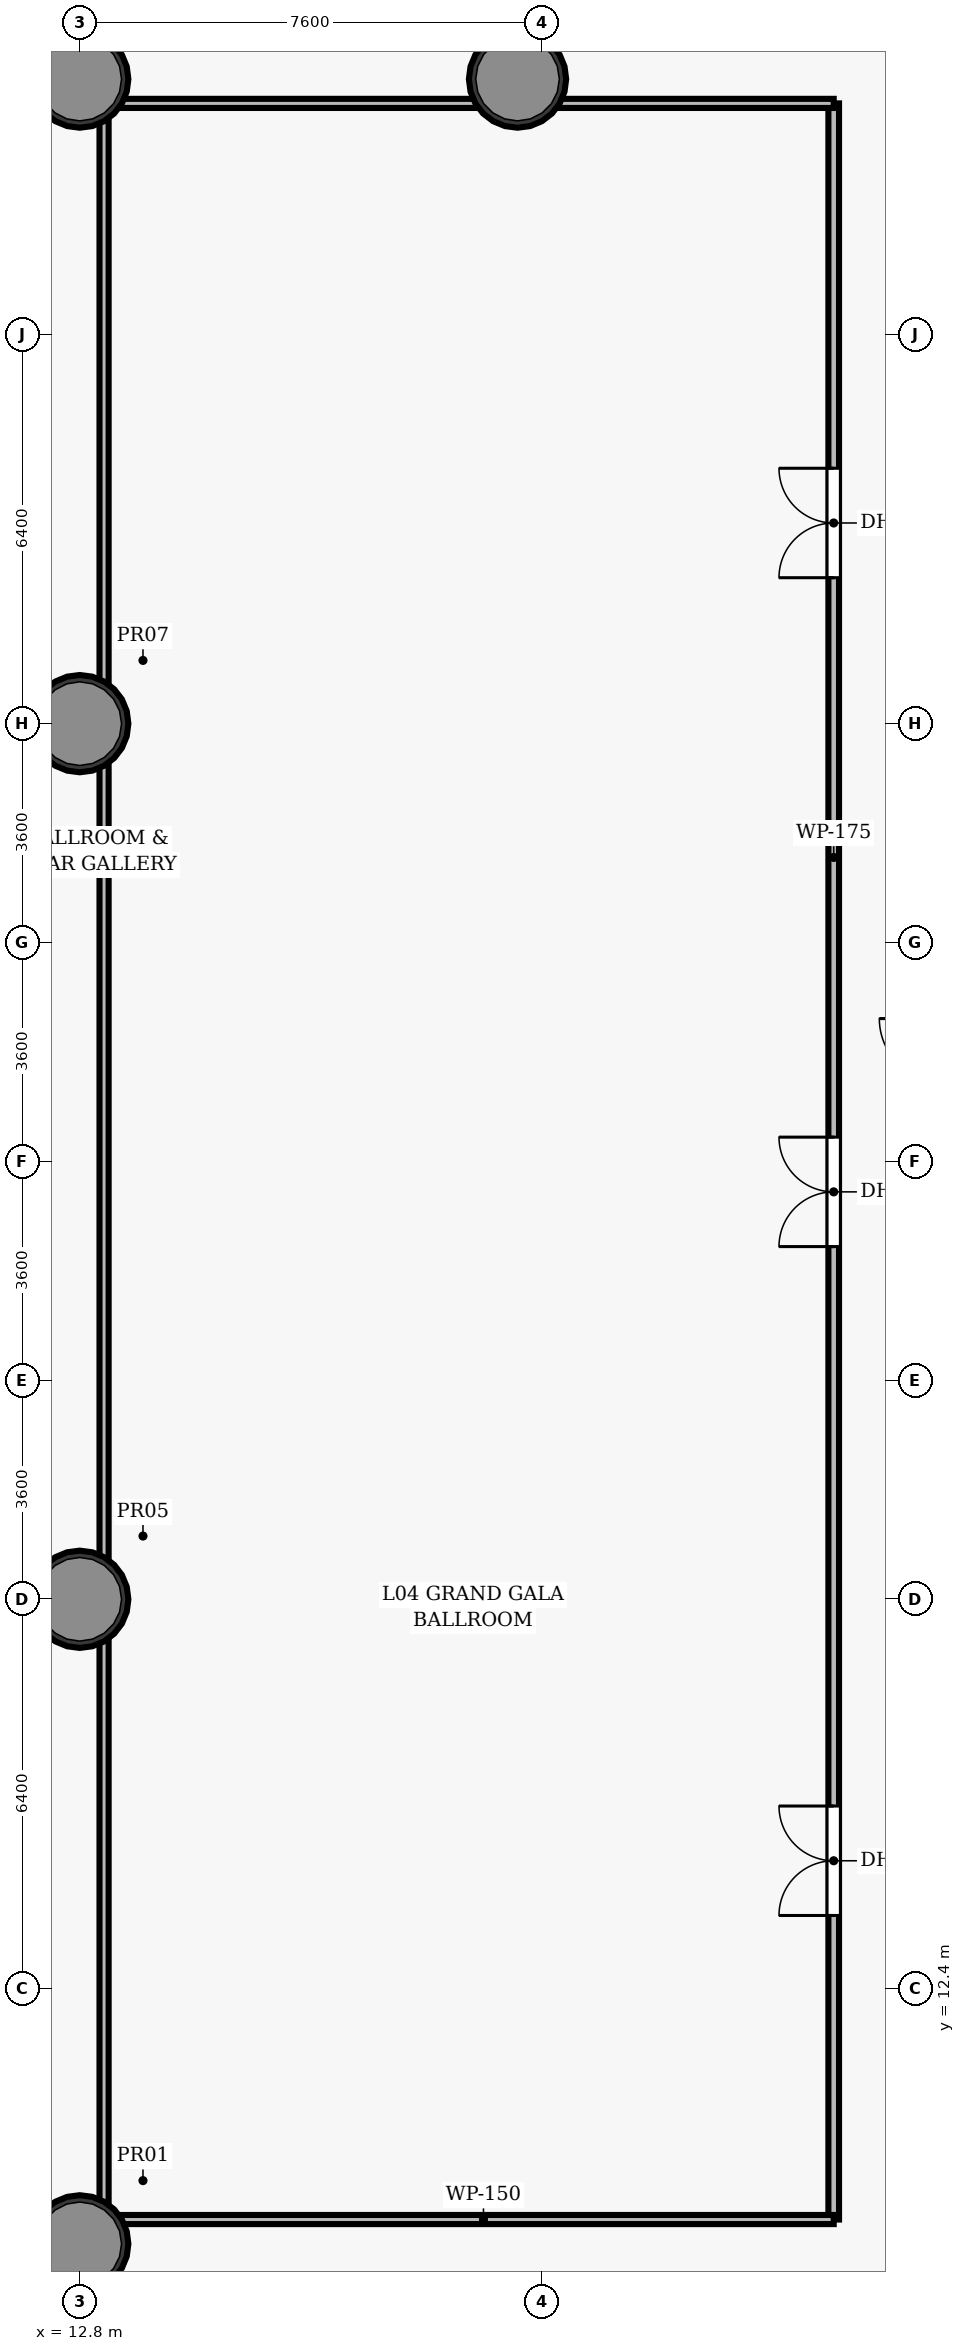
"""IFC4 building model, lengths in metres.
Left out: names, types, materials, properties, quantities, classifications, styles, units other than length and angle.
Written with IfcOpenShell. Run it as: python <this file> out.ifc"""

import sys

from ifc_helpers import new_model, si_unit, direction, frame, frame_2d, origin, origin_2d, place, context, subcontext, project, spatial, rectangle, hollow_circle, extrude, element, fill, save


model = new_model("IFC4")
c1 = context("Model", 3, precision=1e-05, world=origin(), true_north=direction((0.0, 1.0)))
c2 = subcontext(c1, "Body", "Model", "MODEL_VIEW")
j1 = project(units=[si_unit("LENGTHUNIT", "METRE"), si_unit("PLANEANGLEUNIT", "RADIAN")], contexts=[c1])
p1 = place(None, origin())
s1 = spatial("IfcSite", under=j1, at=p1, CompositionType="ELEMENT")
p2 = place(p1, origin())
s2 = spatial("IfcBuilding", under=s1, at=p2, CompositionType="ELEMENT")
p3 = place(p2, frame((0.0, 0.0, 24.0)))
s3 = spatial("IfcBuildingStorey", under=s2, at=p3, CompositionType="ELEMENT", Elevation=24.0)
for number, where, z_axis, x_axis in (
    (1, (12.8, 8.2, 0.0), (0.0, 0.0, 1.0), (1.0, 0.0, 0.0)),
    (2, (12.8, 18.8, 0.0), (0.0, 0.0, 1.0), (1.0, 0.0, 0.0)),
    (3, (12.8, 33.2, 0.0), (0.0, 0.0, 1.0), (1.0, 0.0, 0.0)),
    (4, (12.8, 43.8, 0.0), (0.0, 0.0, 1.0), (1.0, 0.0, 0.0)),
    (5, (20.0, 43.8, 0.0), (0.0, 0.0, 1.0), (1.0, 0.0, 0.0)),
):
    element("IfcColumn", number, at=place(p3, frame(where, z_axis=z_axis, x_axis=x_axis)), inside=s3, PredefinedType="COLUMN", context=c2, shape_type="SweptSolid", body=[
        extrude(hollow_circle(Radius=0.8, WallThickness=0.06, at=origin_2d()), origin(), (0.0, 0.0, 1.0), 6.0),
    ])
p4 = place(p3, frame((25.2, 8.6, 0.0), z_axis=(0.0, 0.0, 1.0), x_axis=(0.0, 1.0, 0.0)))
e6 = element("IfcWall", 6, at=p4, inside=s3, PredefinedType="PARTITIONING", context=c2, shape_type="SweptSolid", body=[
    extrude(rectangle(XDim=34.8, YDim=0.175, at=frame_2d((17.4, 0.0))), origin(), (0.0, 0.0, 1.0), 4.71),
])
p5 = place(p4, frame((5.0, 0.0, 0.0)))
e7 = element("IfcOpeningElement", 7, at=p5, cuts=e6, PredefinedType="OPENING", context=c2, shape_type="SweptSolid", body=[
    extrude(rectangle(XDim=1.8, YDim=2.35, at=frame_2d((0.9, 1.175))), frame((0.0, 0.097, 0.0), z_axis=(0.0, -1.0, 0.0), x_axis=(1.0, 0.0, 0.0)), (0.0, 0.0, 1.0), 0.195),
])
p6 = place(p4, frame((16.0, 0.0, 0.0)))
e8 = element("IfcOpeningElement", 8, at=p6, cuts=e6, PredefinedType="OPENING", context=c2, shape_type="SweptSolid", body=[
    extrude(rectangle(XDim=1.8, YDim=2.35, at=frame_2d((0.9, 1.175))), frame((0.0, 0.097, 0.0), z_axis=(0.0, -1.0, 0.0), x_axis=(1.0, 0.0, 0.0)), (0.0, 0.0, 1.0), 0.195),
])
p7 = place(p4, frame((27.0, 0.0, 0.0)))
e9 = element("IfcOpeningElement", 9, at=p7, cuts=e6, PredefinedType="OPENING", context=c2, shape_type="SweptSolid", body=[
    extrude(rectangle(XDim=1.8, YDim=2.35, at=frame_2d((0.9, 1.175))), frame((0.0, 0.097, 0.0), z_axis=(0.0, -1.0, 0.0), x_axis=(1.0, 0.0, 0.0)), (0.0, 0.0, 1.0), 0.195),
])
for number, where, z_axis, x_axis in (
    (10, (13.2, 8.6, 0.0), (0.0, 0.0, 1.0), (1.0, 0.0, 0.0)),
    (11, (13.2, 43.4, 0.0), (0.0, 0.0, 1.0), (1.0, 0.0, 0.0)),
):
    element("IfcWall", number, at=place(p3, frame(where, z_axis=z_axis, x_axis=x_axis)), inside=s3, PredefinedType="PARTITIONING", context=c2, shape_type="SweptSolid", body=[
        extrude(rectangle(XDim=12.0, YDim=0.15, at=frame_2d((6.0, 0.0))), origin(), (0.0, 0.0, 1.0), 4.71),
    ])
p8 = place(p3, frame((13.2, 8.6, 0.0), z_axis=(0.0, 0.0, 1.0), x_axis=(0.0, 1.0, 0.0)))
e12 = element("IfcWall", 12, at=p8, inside=s3, PredefinedType="PARTITIONING", context=c2, shape_type="SweptSolid", body=[
    extrude(rectangle(XDim=34.8, YDim=0.15, at=frame_2d((17.4, 0.0))), origin(), (0.0, 0.0, 1.0), 4.71),
])
p9 = place(p5, origin())
e13 = element("IfcDoor", 13, at=p9, inside=s3, OperationType="DOUBLE_DOOR_SINGLE_SWING", PredefinedType="DOOR", context=c2, shape_type="SweptSolid", body=[
    extrude(rectangle(XDim=1.8, YDim=2.35, at=frame_2d((0.9, 1.175))), frame((0.0, 0.025, 0.0), z_axis=(0.0, -1.0, 0.0), x_axis=(1.0, 0.0, 0.0)), (0.0, 0.0, 1.0), 0.05),
])
fill(e7, e13)
p10 = place(p6, origin())
e14 = element("IfcDoor", 14, at=p10, inside=s3, OperationType="DOUBLE_DOOR_SINGLE_SWING", PredefinedType="DOOR", context=c2, shape_type="SweptSolid", body=[
    extrude(rectangle(XDim=1.8, YDim=2.35, at=frame_2d((0.9, 1.175))), frame((0.0, 0.025, 0.0), z_axis=(0.0, -1.0, 0.0), x_axis=(1.0, 0.0, 0.0)), (0.0, 0.0, 1.0), 0.05),
])
fill(e8, e14)
p11 = place(p7, origin())
e15 = element("IfcDoor", 15, at=p11, inside=s3, OperationType="DOUBLE_DOOR_SINGLE_SWING", PredefinedType="DOOR", context=c2, shape_type="SweptSolid", body=[
    extrude(rectangle(XDim=1.8, YDim=2.35, at=frame_2d((0.9, 1.175))), frame((0.0, 0.025, 0.0), z_axis=(0.0, -1.0, 0.0), x_axis=(1.0, 0.0, 0.0)), (0.0, 0.0, 1.0), 0.05),
])
fill(e9, e15)
save(model, sys.argv[1])
